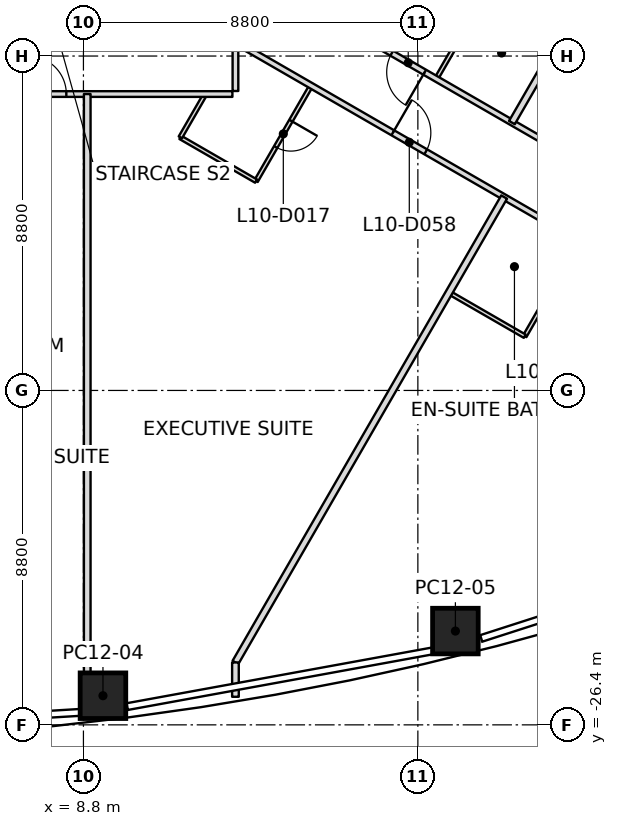
"""IFC4 building model, lengths in metres.
Left out: names, types, materials, properties, quantities, classifications, styles, units other than length and angle.
Written with IfcOpenShell. Run it as: python <this file> out.ifc"""

import sys

from ifc_helpers import new_model, si_unit, direction, frame, frame_2d, origin, origin_2d, place, context, subcontext, project, spatial, rectangle, extrude, clip, halfspace, element, fill, save


model = new_model("IFC4")
c1 = context("Model", 3, precision=1e-05, world=origin(), true_north=direction((0.0, 1.0)))
c2 = subcontext(c1, "Body", "Model", "MODEL_VIEW")
j1 = project(units=[si_unit("LENGTHUNIT", "METRE"), si_unit("PLANEANGLEUNIT", "RADIAN")], contexts=[c1])
p1 = place(None, origin())
s1 = spatial("IfcSite", under=j1, at=p1, CompositionType="ELEMENT")
p2 = place(p1, origin())
s2 = spatial("IfcBuilding", under=s1, at=p2, CompositionType="ELEMENT")
p3 = place(p2, frame((0.0, 0.0, 59.1)))
s3 = spatial("IfcBuildingStorey", under=s2, at=p3, CompositionType="ELEMENT", Elevation=59.1)
p4 = place(p3, frame((9.314, -25.633, 0.0), z_axis=(-0.009390084537, 0.223303928158, 0.974703638026), x_axis=(-0.986945932523, -0.158794334949, 0.026871647957)))
e1 = element("IfcColumn", 1, at=p4, inside=s3, PredefinedType="COLUMN", context=c2, shape_type="SweptSolid", body=[
    extrude(rectangle(XDim=1.2, YDim=1.2, at=origin_2d()), origin(), (0.0, 0.0, 1.0), 3.796),
])
p5 = place(p3, frame((18.587, -23.932, 0.0), z_axis=(-0.018967622747, 0.174735976675, 0.984432612088), x_axis=(0.970613488438, 0.239463695606, -0.023803246622)))
e2 = element("IfcColumn", 2, at=p5, inside=s3, PredefinedType="COLUMN", context=c2, shape_type="SweptSolid", body=[
    clip(clip(extrude(rectangle(XDim=1.2, YDim=1.2, at=origin_2d()), origin(), (0.0, 0.0, 1.0), 3.759), halfspace(frame((0.0, 0.0, 0.001)), True)), halfspace(frame((0.0, 0.0, 3.758)), False)),
])
p6 = place(p3, frame((8.9, -9.8, 0.0), z_axis=(0.0, 0.0, 1.0), x_axis=(0.0, -1.0, 0.0)))
e3 = element("IfcWall", 3, at=p6, inside=s3, PredefinedType="PARTITIONING", context=c2, shape_type="SweptSolid", body=[
    extrude(rectangle(XDim=16.409, YDim=0.175, at=frame_2d((8.205, 0.0))), origin(), (0.0, 0.0, 1.0), 3.15),
])
p7 = place(p3, frame((19.87, -12.511, 0.0), z_axis=(0.0, 0.0, 1.0), x_axis=(-0.500001430823, -0.866024577697, 0.0)))
e4 = element("IfcWall", 4, at=p7, inside=s3, PredefinedType="PARTITIONING", context=c2, shape_type="SweptSolid", body=[
    extrude(rectangle(XDim=14.141, YDim=0.175, at=frame_2d((7.07, 0.0))), origin(), (0.0, 0.0, 1.0), 2.797),
])
p8 = place(p3, frame((12.8, -24.758, 0.0), z_axis=(0.0, 0.0, 1.0), x_axis=(0.0, -1.0, 0.0)))
e5 = element("IfcWall", 5, at=p8, inside=s3, PredefinedType="PARTITIONING", context=c2, shape_type="SweptSolid", body=[
    extrude(rectangle(XDim=0.904, YDim=0.175, at=frame_2d((0.452, 0.0))), origin(), (0.0, 0.0, 1.0), 3.15),
])
p9 = place(p3, frame((26.124, -0.073, 0.0), z_axis=(0.0, 0.0, 1.0), x_axis=(-0.49999146167, -0.866030333335, 0.0)))
e6 = element("IfcWall", 6, at=p9, inside=s3, PredefinedType="PARTITIONING", context=c2, shape_type="SweptSolid", body=[
    extrude(rectangle(XDim=12.098, YDim=0.175, at=frame_2d((6.049, 0.0))), origin(), (0.0, 0.0, 1.0), 2.934),
])
p10 = place(p3, frame((-12.72, -9.8, 0.0), z_axis=(0.0, 0.0, 1.0), x_axis=(1.0, 0.0, 0.0)))
e7 = element("IfcWall", 7, at=p10, inside=s3, PredefinedType="PARTITIONING", context=c2, shape_type="SweptSolid", body=[
    extrude(rectangle(XDim=25.44, YDim=0.15, at=frame_2d((12.72, 0.0))), origin(), (0.0, 0.0, 1.0), 2.947),
])
p11 = place(p10, frame((3.07, 0.0, 0.0)))
e8 = element("IfcOpeningElement", 8, at=p11, cuts=e7, PredefinedType="OPENING", context=c2, shape_type="SweptSolid", body=[
    extrude(rectangle(XDim=1.0, YDim=2.1, at=frame_2d((0.5, 1.05))), frame((0.0, 0.075, 0.0), z_axis=(0.0, -1.0, 0.0), x_axis=(1.0, 0.0, 0.0)), (0.0, 0.0, 1.0), 0.15),
])
p12 = place(p10, frame((7.47, 0.0, 0.0)))
e9 = element("IfcOpeningElement", 9, at=p12, cuts=e7, PredefinedType="OPENING", context=c2, shape_type="SweptSolid", body=[
    extrude(rectangle(XDim=1.0, YDim=2.1, at=frame_2d((0.5, 1.05))), frame((0.0, 0.075, 0.0), z_axis=(0.0, -1.0, 0.0), x_axis=(1.0, 0.0, 0.0)), (0.0, 0.0, 1.0), 0.15),
])
p13 = place(p10, frame((11.67, 0.0, 0.0)))
e10 = element("IfcOpeningElement", 10, at=p13, cuts=e7, PredefinedType="OPENING", context=c2, shape_type="SweptSolid", body=[
    extrude(rectangle(XDim=1.0, YDim=2.1, at=frame_2d((0.5, 1.05))), frame((0.0, 0.075, 0.0), z_axis=(0.0, -1.0, 0.0), x_axis=(1.0, 0.0, 0.0)), (0.0, 0.0, 1.0), 0.15),
])
p14 = place(p10, frame((15.87, 0.0, 0.0)))
e11 = element("IfcOpeningElement", 11, at=p14, cuts=e7, PredefinedType="OPENING", context=c2, shape_type="SweptSolid", body=[
    extrude(rectangle(XDim=1.0, YDim=2.1, at=frame_2d((0.5, 1.05))), frame((0.0, 0.075, 0.0), z_axis=(0.0, -1.0, 0.0), x_axis=(1.0, 0.0, 0.0)), (0.0, 0.0, 1.0), 0.15),
])
p15 = place(p10, frame((20.07, 0.0, 0.0)))
e12 = element("IfcOpeningElement", 12, at=p15, cuts=e7, PredefinedType="OPENING", context=c2, shape_type="SweptSolid", body=[
    extrude(rectangle(XDim=1.0, YDim=2.1, at=frame_2d((0.5, 1.05))), frame((0.0, 0.075, 0.0), z_axis=(0.0, -1.0, 0.0), x_axis=(1.0, 0.0, 0.0)), (0.0, 0.0, 1.0), 0.15),
])
p16 = place(p3, frame((12.8, -9.72, 0.0), z_axis=(0.0, 0.0, 1.0), x_axis=(0.0, 1.0, 0.0)))
e13 = element("IfcWall", 13, at=p16, inside=s3, PredefinedType="PARTITIONING", context=c2, shape_type="SweptSolid", body=[
    extrude(rectangle(XDim=1.291, YDim=0.15, at=frame_2d((0.646, 0.0))), origin(), (0.0, 0.0, 1.0), 2.797),
])
p17 = place(p3, frame((12.879, -8.475, 0.0), z_axis=(0.0, 0.0, 1.0), x_axis=(0.866021146684, -0.500007373442, 0.0)))
e14 = element("IfcWall", 14, at=p17, inside=s3, PredefinedType="PARTITIONING", context=c2, shape_type="SweptSolid", body=[
    extrude(rectangle(XDim=11.892, YDim=0.15, at=frame_2d((5.946, 0.0))), origin(), (0.0, 0.0, 1.0), 2.797),
])
p18 = place(p17, frame((4.69, 0.0, 0.0)))
e15 = element("IfcOpeningElement", 15, at=p18, cuts=e14, PredefinedType="OPENING", context=c2, shape_type="SweptSolid", body=[
    extrude(rectangle(XDim=1.0, YDim=2.1, at=frame_2d((0.5, 1.05))), frame((0.0, 0.075, 0.0), z_axis=(0.0, -1.0, 0.0), x_axis=(1.0, 0.0, 0.0)), (0.0, 0.0, 1.0), 0.15),
])
p19 = place(p17, frame((10.723, 0.0, 0.0)))
e16 = element("IfcOpeningElement", 16, at=p19, cuts=e14, PredefinedType="OPENING", context=c2, shape_type="SweptSolid", body=[
    extrude(rectangle(XDim=1.0, YDim=2.1, at=frame_2d((0.5, 1.05))), frame((0.0, 0.075, 0.0), z_axis=(0.0, -1.0, 0.0), x_axis=(1.0, 0.0, 0.0)), (0.0, 0.0, 1.0), 0.15),
])
p20 = place(p3, frame((24.079, -12.863, 0.0), z_axis=(0.0, 0.0, 1.0), x_axis=(-0.866024189303, 0.500002103537, 0.0)))
e17 = element("IfcWall", 17, at=p20, inside=s3, PredefinedType="PARTITIONING", context=c2, shape_type="SweptSolid", body=[
    extrude(rectangle(XDim=13.023, YDim=0.15, at=frame_2d((6.512, 0.0))), origin(), (0.0, 0.0, 1.0), 2.947),
])
p21 = place(p20, frame((1.771, 0.0, 0.0)))
e18 = element("IfcOpeningElement", 18, at=p21, cuts=e17, PredefinedType="OPENING", context=c2, shape_type="SweptSolid", body=[
    extrude(rectangle(XDim=1.0, YDim=2.1, at=frame_2d((0.5, 1.05))), frame((0.0, 0.075, 0.0), z_axis=(0.0, -1.0, 0.0), x_axis=(1.0, 0.0, 0.0)), (0.0, 0.0, 1.0), 0.15),
])
p22 = place(p20, frame((7.273, 0.0, 0.0)))
e19 = element("IfcOpeningElement", 19, at=p22, cuts=e17, PredefinedType="OPENING", context=c2, shape_type="SweptSolid", body=[
    extrude(rectangle(XDim=1.0, YDim=2.1, at=frame_2d((0.5, 1.05))), frame((0.0, 0.075, 0.0), z_axis=(0.0, -1.0, 0.0), x_axis=(1.0, 0.0, 0.0)), (0.0, 0.0, 1.0), 0.15),
])
p23 = place(p3, frame((14.777, -9.605, 0.0), z_axis=(0.0, 0.0, 1.0), x_axis=(-0.499999802827, -0.866025517622, 0.0)))
e20 = element("IfcWall", 20, at=p23, inside=s3, PredefinedType="PARTITIONING", context=c2, shape_type="SweptSolid", body=[
    extrude(rectangle(XDim=2.87, YDim=0.1, at=frame_2d((1.435, 0.0))), origin(), (0.0, 0.0, 1.0), 2.797),
])
p24 = place(p23, frame((1.035, 0.0, 0.0)))
e21 = element("IfcOpeningElement", 21, at=p24, cuts=e20, PredefinedType="OPENING", context=c2, shape_type="SweptSolid", body=[
    extrude(rectangle(XDim=0.8, YDim=2.1, at=frame_2d((0.4, 1.05))), frame((0.0, 0.05, 0.0), z_axis=(0.0, -1.0, 0.0), x_axis=(1.0, 0.0, 0.0)), (0.0, 0.0, 1.0), 0.1),
])
p25 = place(p3, frame((13.342, -12.091, 0.0), z_axis=(0.0, 0.0, 1.0), x_axis=(-0.86602648383, 0.499998129301, 0.0)))
e22 = element("IfcWall", 22, at=p25, inside=s3, PredefinedType="PARTITIONING", context=c2, shape_type="SweptSolid", body=[
    extrude(rectangle(XDim=2.3, YDim=0.1, at=frame_2d((1.15, 0.0))), origin(), (0.0, 0.0, 1.0), 2.947),
])
p26 = place(p3, frame((11.35, -10.941, 0.0), z_axis=(0.0, 0.0, 1.0), x_axis=(0.499865263774, 0.866103179807, 0.0)))
e23 = element("IfcWall", 23, at=p26, inside=s3, PredefinedType="PARTITIONING", context=c2, shape_type="SweptSolid", body=[
    extrude(rectangle(XDim=1.282, YDim=0.1, at=frame_2d((0.641, 0.0))), origin(), (0.0, 0.0, 1.0), 3.15),
])
p27 = place(p3, frame((18.098, -9.375, 0.0), z_axis=(0.0, 0.0, 1.0), x_axis=(0.499936001555, 0.866062350151, 0.0)))
e24 = element("IfcWall", 24, at=p27, inside=s3, PredefinedType="PARTITIONING", context=c2, shape_type="SweptSolid", body=[
    extrude(rectangle(XDim=2.87, YDim=0.1, at=frame_2d((1.435, 0.0))), origin(), (0.0, 0.0, 1.0), 2.947),
])
p28 = place(p27, frame((1.035, 0.0, 0.0)))
e25 = element("IfcOpeningElement", 25, at=p28, cuts=e24, PredefinedType="OPENING", context=c2, shape_type="SweptSolid", body=[
    extrude(rectangle(XDim=0.8, YDim=2.1, at=frame_2d((0.4, 1.05))), frame((0.0, 0.05, 0.0), z_axis=(0.0, -1.0, 0.0), x_axis=(1.0, 0.0, 0.0)), (0.0, 0.0, 1.0), 0.1),
])
p29 = place(p3, frame((21.847, -13.687, 0.0), z_axis=(0.0, 0.0, 1.0), x_axis=(-0.499999802827, -0.866025517622, 0.0)))
e26 = element("IfcWall", 26, at=p29, inside=s3, PredefinedType="PARTITIONING", context=c2, shape_type="SweptSolid", body=[
    extrude(rectangle(XDim=2.87, YDim=0.1, at=frame_2d((1.435, 0.0))), origin(), (0.0, 0.0, 1.0), 3.15),
])
p30 = place(p29, frame((1.035, 0.0, 0.0)))
e27 = element("IfcOpeningElement", 27, at=p30, cuts=e26, PredefinedType="OPENING", context=c2, shape_type="SweptSolid", body=[
    extrude(rectangle(XDim=0.8, YDim=2.1, at=frame_2d((0.4, 1.05))), frame((0.0, 0.05, 0.0), z_axis=(0.0, -1.0, 0.0), x_axis=(1.0, 0.0, 0.0)), (0.0, 0.0, 1.0), 0.1),
])
p31 = place(p3, frame((20.412, -16.173, 0.0), z_axis=(0.0, 0.0, 1.0), x_axis=(-0.866017224141, 0.500014167291, 0.0)))
e28 = element("IfcWall", 28, at=p31, inside=s3, PredefinedType="PARTITIONING", context=c2, shape_type="SweptSolid", body=[
    extrude(rectangle(XDim=2.27, YDim=0.1, at=frame_2d((1.135, 0.0))), origin(), (0.0, 0.0, 1.0), 3.15),
])
p32 = place(p15, origin())
e29 = element("IfcDoor", 29, at=p32, inside=s3, OperationType="SINGLE_SWING_LEFT", PredefinedType="DOOR", context=c2, shape_type="SweptSolid", body=[
    extrude(rectangle(XDim=1.0, YDim=2.1, at=frame_2d((0.5, 1.05))), frame((0.0, 0.025, 0.0), z_axis=(0.0, -1.0, 0.0), x_axis=(1.0, 0.0, 0.0)), (0.0, 0.0, 1.0), 0.05),
])
fill(e12, e29)
p33 = place(p18, origin())
e30 = element("IfcDoor", 30, at=p33, inside=s3, OperationType="SINGLE_SWING_LEFT", PredefinedType="DOOR", context=c2, shape_type="SweptSolid", body=[
    extrude(rectangle(XDim=1.0, YDim=2.1, at=frame_2d((0.5, 1.05))), frame((0.0, 0.025, 0.0), z_axis=(0.0, -1.0, 0.0), x_axis=(1.0, 0.0, 0.0)), (0.0, 0.0, 1.0), 0.05),
])
fill(e15, e30)
p34 = place(p24, origin())
e31 = element("IfcDoor", 31, at=p34, inside=s3, OperationType="SINGLE_SWING_LEFT", PredefinedType="DOOR", context=c2, shape_type="SweptSolid", body=[
    extrude(rectangle(XDim=0.8, YDim=2.1, at=frame_2d((0.4, 1.05))), frame((0.0, 0.025, 0.0), z_axis=(0.0, -1.0, 0.0), x_axis=(1.0, 0.0, 0.0)), (0.0, 0.0, 1.0), 0.05),
])
fill(e21, e31)
p35 = place(p22, origin())
e32 = element("IfcDoor", 32, at=p35, inside=s3, OperationType="SINGLE_SWING_LEFT", PredefinedType="DOOR", context=c2, shape_type="SweptSolid", body=[
    extrude(rectangle(XDim=1.0, YDim=2.1, at=frame_2d((0.5, 1.05))), frame((0.0, 0.025, 0.0), z_axis=(0.0, -1.0, 0.0), x_axis=(1.0, 0.0, 0.0)), (0.0, 0.0, 1.0), 0.05),
])
fill(e19, e32)
save(model, sys.argv[1])
